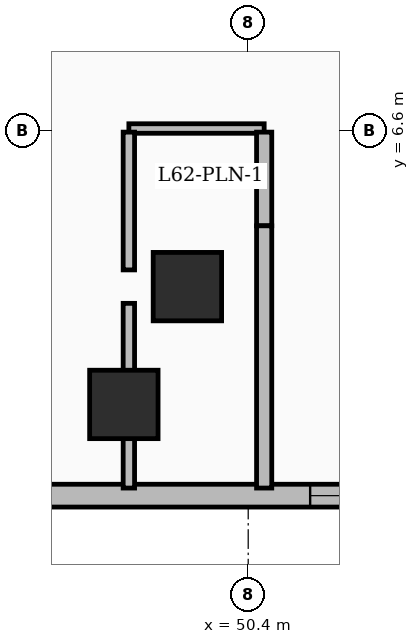
"""IFC4 building model, lengths in metres.
Left out: names, types, materials, properties, quantities, classifications, styles, units other than length and angle.
Written with IfcOpenShell. Run it as: python <this file> out.ifc"""

import sys

from ifc_helpers import new_model, si_unit, direction, frame, frame_2d, origin, origin_2d, place, context, subcontext, project, spatial, rectangle, extrude, element, fill, save


model = new_model("IFC4")
c1 = context("Model", 3, precision=1e-05, world=origin(), true_north=direction((0.0, 1.0)))
c2 = subcontext(c1, "Body", "Model", "MODEL_VIEW")
j1 = project(units=[si_unit("LENGTHUNIT", "METRE"), si_unit("PLANEANGLEUNIT", "RADIAN")], contexts=[c1])
p1 = place(None, origin())
s1 = spatial("IfcSite", under=j1, at=p1, CompositionType="ELEMENT")
p2 = place(p1, origin())
s2 = spatial("IfcBuilding", under=s1, at=p2, CompositionType="ELEMENT")
p3 = place(p2, frame((0.0, 0.0, 240.75)))
s3 = spatial("IfcBuildingStorey", under=s2, at=p3, CompositionType="ELEMENT", Elevation=240.75)
for number, where, z_axis, x_axis in (
    (1, (49.6, 4.55, 0.0), (0.0, 0.0, 1.0), (1.0, 0.0, 0.0)),
    (2, (48.764, 3.0, 0.0), (0.0, 0.0, 1.0), (1.0, 0.0, 0.0)),
):
    element("IfcColumn", number, at=place(p3, frame(where, z_axis=z_axis, x_axis=x_axis)), inside=s3, PredefinedType="COLUMN", context=c2, shape_type="SweptSolid", body=[
        extrude(rectangle(XDim=0.9, YDim=0.9, at=origin_2d()), origin(), (0.0, 0.0, 1.0), 3.75),
    ])
p4 = place(p3, frame((53.975, 1.8, 0.0), z_axis=(0.0, 0.0, 1.0), x_axis=(-1.0, 0.0, 0.0)))
e3 = element("IfcWall", 3, at=p4, inside=s3, PredefinedType="SOLIDWALL", context=c2, shape_type="SweptSolid", body=[
    extrude(rectangle(XDim=7.575, YDim=0.3, at=frame_2d((3.788, 0.0))), origin(), (0.0, 0.0, 1.0), 3.5),
])
p5 = place(p4, frame((1.16, 0.0, 0.55)))
e4 = element("IfcOpeningElement", 4, at=p5, cuts=e3, PredefinedType="OPENING", context=c2, shape_type="SweptSolid", body=[
    extrude(rectangle(XDim=1.6, YDim=2.2, at=frame_2d((0.8, 1.1))), frame((0.0, 0.16, 0.0), z_axis=(0.0, -1.0, 0.0), x_axis=(1.0, 0.0, 0.0)), (0.0, 0.0, 1.0), 0.32),
])
p6 = place(p3, frame((48.83, 6.63, 0.0), z_axis=(0.0, 0.0, 1.0), x_axis=(1.0, 0.0, 0.0)))
e5 = element("IfcWall", 5, at=p6, inside=s3, PredefinedType="PARTITIONING", context=c2, shape_type="SweptSolid", body=[
    extrude(rectangle(XDim=1.78, YDim=0.125, at=frame_2d((0.89, 0.0))), origin(), (0.0, 0.0, 1.0), 3.5),
])
p7 = place(p3, frame((48.83, 1.9, 0.0), z_axis=(0.0, 0.0, 1.0), x_axis=(0.0, 1.0, 0.0)))
e6 = element("IfcWall", 6, at=p7, inside=s3, PredefinedType="PARTITIONING", context=c2, shape_type="SweptSolid", body=[
    extrude(rectangle(XDim=2.43, YDim=0.15, at=frame_2d((1.215, 0.0))), origin(), (0.0, 0.0, 1.0), 2.82),
])
p8 = place(p3, frame((48.83, 4.77, 0.0), z_axis=(0.0, 0.0, 1.0), x_axis=(0.0, 1.0, 0.0)))
e7 = element("IfcWall", 7, at=p8, inside=s3, PredefinedType="PARTITIONING", context=c2, shape_type="SweptSolid", body=[
    extrude(rectangle(XDim=1.812, YDim=0.15, at=frame_2d((0.906, 0.0))), origin(), (0.0, 0.0, 1.0), 3.5),
])
p9 = place(p3, frame((50.61, 5.35, 0.0), z_axis=(0.0, 0.0, 1.0), x_axis=(0.0, 1.0, 0.0)))
e8 = element("IfcWall", 8, at=p9, inside=s3, PredefinedType="PARTITIONING", context=c2, shape_type="SweptSolid", body=[
    extrude(rectangle(XDim=1.232, YDim=0.2, at=frame_2d((0.616, 0.0))), origin(), (0.0, 0.0, 1.0), 2.82),
])
p10 = place(p3, frame((50.61, 1.9, 0.0), z_axis=(0.0, 0.0, 1.0), x_axis=(0.0, 1.0, 0.0)))
e9 = element("IfcWall", 9, at=p10, inside=s3, PredefinedType="PARTITIONING", context=c2, shape_type="SweptSolid", body=[
    extrude(rectangle(XDim=3.45, YDim=0.2, at=frame_2d((1.725, 0.0))), origin(), (0.0, 0.0, 1.0), 2.82),
])
p11 = place(p5, origin())
e10 = element("IfcWindow", 10, at=p11, inside=s3, PartitioningType="SINGLE_PANEL", PredefinedType="WINDOW", context=c2, shape_type="SweptSolid", body=[
    extrude(rectangle(XDim=1.6, YDim=2.2, at=frame_2d((0.8, 1.1))), frame((0.0, 0.03, 0.0), z_axis=(0.0, -1.0, 0.0), x_axis=(1.0, 0.0, 0.0)), (0.0, 0.0, 1.0), 0.06),
])
fill(e4, e10)
save(model, sys.argv[1])
